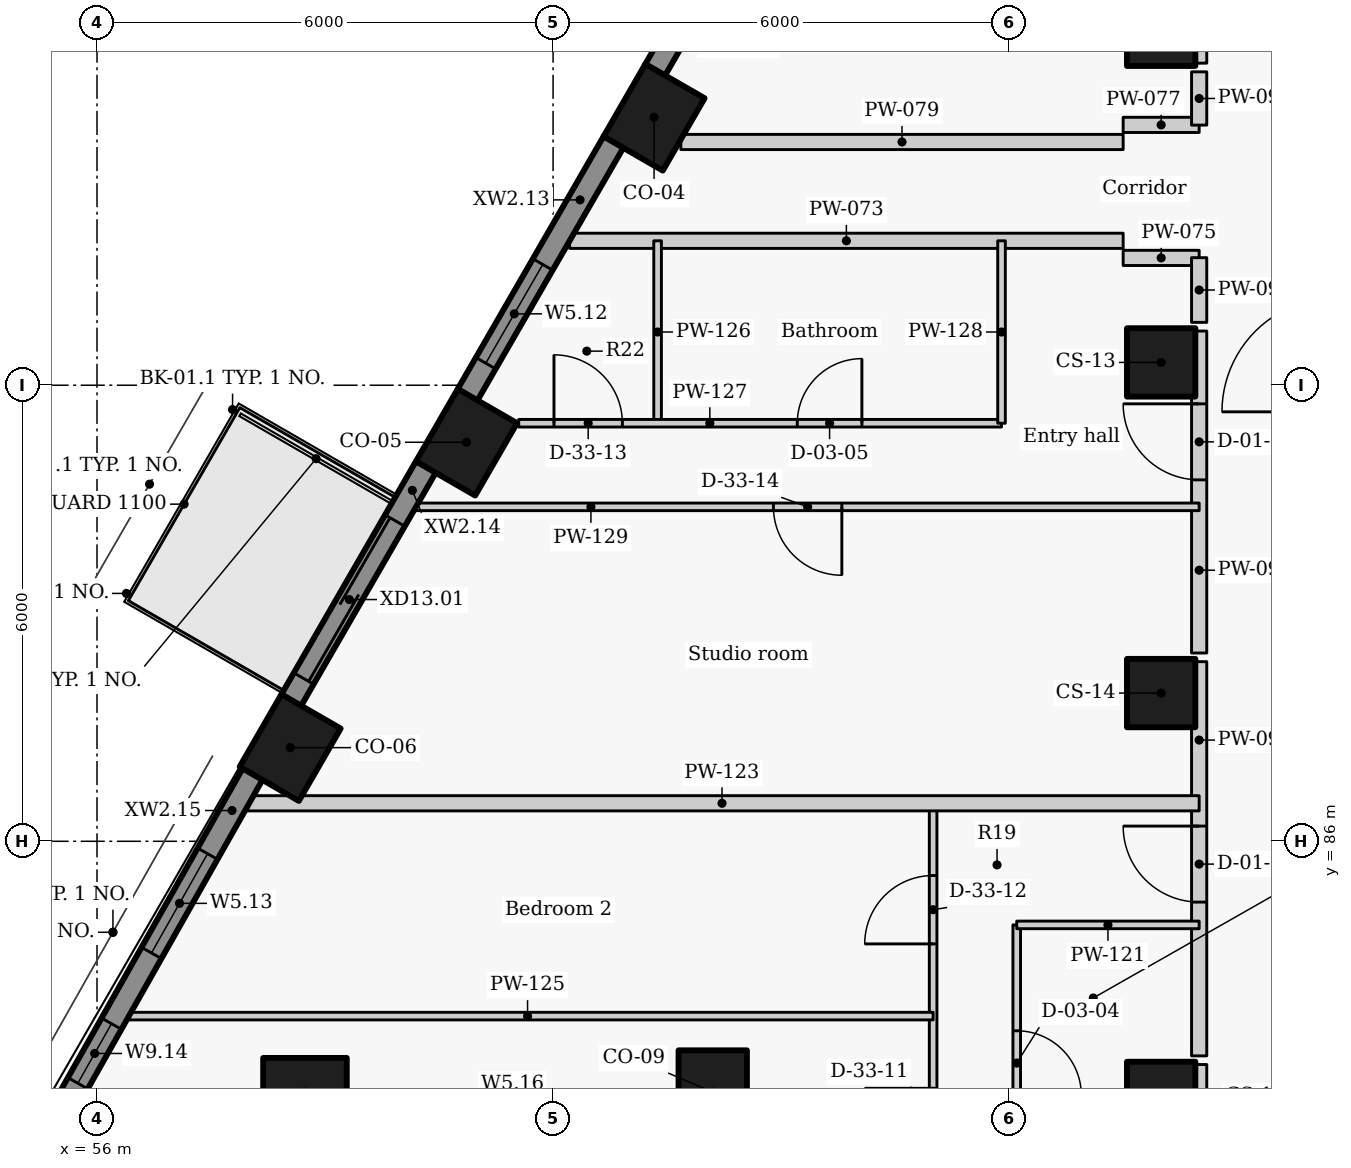
"""IFC4 building model, lengths in metres.
Left out: names, types, materials, properties, quantities, classifications, styles, units other than length and angle.
Written with IfcOpenShell. Run it as: python <this file> out.ifc"""

import sys

from ifc_helpers import new_model, si_unit, direction, frame, frame_2d, origin, origin_2d, place, context, subcontext, project, spatial, rectangle, extrude, element, fill, save


model = new_model("IFC4")
c1 = context("Model", 3, precision=1e-05, world=origin(), true_north=direction((0.0, 1.0)))
c2 = subcontext(c1, "Body", "Model", "MODEL_VIEW")
j1 = project(units=[si_unit("LENGTHUNIT", "METRE"), si_unit("PLANEANGLEUNIT", "RADIAN")], contexts=[c1])
p1 = place(None, origin())
s1 = spatial("IfcSite", under=j1, at=p1, CompositionType="ELEMENT")
p2 = place(p1, origin())
s2 = spatial("IfcBuilding", under=s1, at=p2, CompositionType="ELEMENT")
p3 = place(p2, frame((0.0, 0.0, 239.4)))
s3 = spatial("IfcBuildingStorey", under=s2, at=p3, CompositionType="ELEMENT", Elevation=239.4)
for number, where, z_axis, x_axis in (
    (1, (63.329, 95.525, 0.0), (0.0, 0.0, 1.0), (-0.5, -0.866, 0.0)),
    (2, (60.861, 91.25, 0.0), (0.0, 0.0, 1.0), (-0.5, -0.866, 0.0)),
    (3, (58.541, 87.232, 0.0), (0.0, 0.0, 1.0), (-0.5, -0.866, 0.0)),
    (4, (58.736, 82.7, 0.0), (0.0, 0.0, 1.0), (1.0, 0.0, 0.0)),
    (5, (64.101, 82.7, 0.0), (0.0, 0.0, 1.0), (0.0, -1.0, 0.0)),
):
    element("IfcColumn", number, at=place(p3, frame(where, z_axis=z_axis, x_axis=x_axis)), inside=s3, PredefinedType="COLUMN", context=c2, shape_type="SweptSolid", body=[
        extrude(rectangle(XDim=1.1, YDim=0.9, at=origin_2d()), origin(), (0.0, 0.0, 1.0), 3.3),
    ])
for number, where, z_axis, x_axis in (
    (6, (70.0, 96.65, 0.0), (0.0, 0.0, 1.0), (0.0, -1.0, 0.0)),
    (7, (70.0, 92.3, 0.0), (0.0, 0.0, 1.0), (0.0, -1.0, 0.0)),
    (8, (70.0, 87.95, 0.0), (0.0, 0.0, 1.0), (0.0, -1.0, 0.0)),
    (9, (70.0, 82.65, 0.0), (0.0, 0.0, 1.0), (0.0, -1.0, 0.0)),
):
    element("IfcColumn", number, at=place(p3, frame(where, z_axis=z_axis, x_axis=x_axis)), inside=s3, PredefinedType="COLUMN", context=c2, shape_type="SweptSolid", body=[
        extrude(rectangle(XDim=0.9, YDim=0.9, at=origin_2d()), origin(), (0.0, 0.0, 1.0), 3.3),
    ])
p4 = place(p3, frame((65.264, 99.477, 0.0), z_axis=(0.0, 0.0, 1.0), x_axis=(-0.499984490703, -0.866034357896, 0.0)))
e10 = element("IfcWall", 10, at=p4, inside=s3, PredefinedType="SOLIDWALL", context=c2, shape_type="SweptSolid", body=[
    extrude(rectangle(XDim=3.844, YDim=0.3, at=frame_2d((1.922, 0.0))), origin(), (0.0, 0.0, 1.0), 2.425),
])
p5 = place(p4, frame((0.872, 0.0, 0.9)))
e11 = element("IfcOpeningElement", 11, at=p5, cuts=e10, PredefinedType="OPENING", context=c2, shape_type="SweptSolid", body=[
    extrude(rectangle(XDim=2.1, YDim=1.1, at=frame_2d((1.05, 0.55))), frame((0.0, 0.16, 0.0), z_axis=(0.0, -1.0, 0.0), x_axis=(1.0, 0.0, 0.0)), (0.0, 0.0, 1.0), 0.32),
])
p6 = place(p3, frame((62.796, 95.202, 0.0), z_axis=(0.0, 0.0, 1.0), x_axis=(-0.499984490703, -0.866034357896, 0.0)))
e12 = element("IfcWall", 12, at=p6, inside=s3, PredefinedType="SOLIDWALL", context=c2, shape_type="SweptSolid", body=[
    extrude(rectangle(XDim=3.844, YDim=0.3, at=frame_2d((1.922, 0.0))), origin(), (0.0, 0.0, 1.0), 2.425),
])
p7 = place(p6, frame((1.863, 0.0, 0.9)))
e13 = element("IfcOpeningElement", 13, at=p7, cuts=e12, PredefinedType="OPENING", context=c2, shape_type="SweptSolid", body=[
    extrude(rectangle(XDim=1.5, YDim=1.1, at=frame_2d((0.75, 0.55))), frame((0.0, 0.16, 0.0), z_axis=(0.0, -1.0, 0.0), x_axis=(1.0, 0.0, 0.0)), (0.0, 0.0, 1.0), 0.32),
])
p8 = place(p3, frame((60.328, 90.927, 0.0), z_axis=(0.0, 0.0, 1.0), x_axis=(-0.500010404316, -0.866019396766, 0.0)))
e14 = element("IfcWall", 14, at=p8, inside=s3, PredefinedType="SOLIDWALL", context=c2, shape_type="SweptSolid", body=[
    extrude(rectangle(XDim=3.547, YDim=0.3, at=frame_2d((1.774, 0.0))), origin(), (0.0, 0.0, 1.0), 2.425),
])
p9 = place(p8, frame((0.817, 0.0, 0.0)))
e15 = element("IfcOpeningElement", 15, at=p9, cuts=e14, PredefinedType="OPENING", context=c2, shape_type="SweptSolid", body=[
    extrude(rectangle(XDim=2.4, YDim=2.0, at=frame_2d((1.2, 1.0))), frame((0.0, 0.16, 0.0), z_axis=(0.0, -1.0, 0.0), x_axis=(1.0, 0.0, 0.0)), (0.0, 0.0, 1.0), 0.32),
])
p10 = place(p3, frame((58.048, 86.886, 0.0), z_axis=(0.0, 0.0, 1.0), x_axis=(-0.492080931903, -0.870549456641, 0.0)))
e16 = element("IfcWall", 16, at=p10, inside=s3, PredefinedType="SOLIDWALL", context=c2, shape_type="SweptSolid", body=[
    extrude(rectangle(XDim=5.437, YDim=0.3, at=frame_2d((2.718, 0.0))), origin(), (0.0, 0.0, 1.0), 2.425),
])
p11 = place(p10, frame((1.206, 0.0, 0.9)))
e17 = element("IfcOpeningElement", 17, at=p11, cuts=e16, PredefinedType="OPENING", context=c2, shape_type="SweptSolid", body=[
    extrude(rectangle(XDim=1.5, YDim=1.1, at=frame_2d((0.75, 0.55))), frame((0.0, 0.16, 0.0), z_axis=(0.0, -1.0, 0.0), x_axis=(1.0, 0.0, 0.0)), (0.0, 0.0, 1.0), 0.32),
])
p12 = place(p10, frame((3.775, 0.0, 0.9)))
e18 = element("IfcOpeningElement", 18, at=p12, cuts=e16, PredefinedType="OPENING", context=c2, shape_type="SweptSolid", body=[
    extrude(rectangle(XDim=0.9, YDim=1.1, at=frame_2d((0.45, 0.55))), frame((0.0, 0.16, 0.0), z_axis=(0.0, -1.0, 0.0), x_axis=(1.0, 0.0, 0.0)), (0.0, 0.0, 1.0), 0.32),
])
p13 = place(p3, frame((62.218, 93.9, 0.0), z_axis=(0.0, 0.0, 1.0), x_axis=(1.0, 0.0, 0.0)))
e19 = element("IfcWall", 19, at=p13, inside=s3, PredefinedType="PARTITIONING", context=c2, shape_type="SweptSolid", body=[
    extrude(rectangle(XDim=7.282, YDim=0.2, at=frame_2d((3.641, 0.0))), origin(), (0.0, 0.0, 1.0), 2.405),
])
for number, where, z_axis, x_axis in (
    (20, (69.5, 93.675, 0.0), (0.0, 0.0, 1.0), (1.0, 0.0, 0.0)),
    (21, (69.5, 95.425, 0.0), (0.0, 0.0, 1.0), (1.0, 0.0, 0.0)),
):
    element("IfcWall", number, at=place(p3, frame(where, z_axis=z_axis, x_axis=x_axis)), inside=s3, PredefinedType="PARTITIONING", context=c2, shape_type="SweptSolid", body=[
        extrude(rectangle(XDim=1.0, YDim=0.2, at=frame_2d((0.5, 0.0))), origin(), (0.0, 0.0, 1.0), 2.505),
    ])
p14 = place(p3, frame((63.681, 95.2, 0.0), z_axis=(0.0, 0.0, 1.0), x_axis=(1.0, 0.0, 0.0)))
e22 = element("IfcWall", 22, at=p14, inside=s3, PredefinedType="PARTITIONING", context=c2, shape_type="SweptSolid", body=[
    extrude(rectangle(XDim=5.819, YDim=0.2, at=frame_2d((2.909, 0.0))), origin(), (0.0, 0.0, 1.0), 3.025),
])
p15 = place(p3, frame((70.5, 72.577, 0.0), z_axis=(0.0, 0.0, 1.0), x_axis=(0.0, 1.0, 0.0)))
e23 = element("IfcWall", 23, at=p15, inside=s3, PredefinedType="PARTITIONING", context=c2, shape_type="SweptSolid", body=[
    extrude(rectangle(XDim=10.486, YDim=0.2, at=frame_2d((5.243, 0.0))), origin(), (0.0, 0.0, 1.0), 3.025),
])
p16 = place(p15, frame((3.023, 0.0, 0.0)))
e24 = element("IfcOpeningElement", 24, at=p16, cuts=e23, PredefinedType="OPENING", context=c2, shape_type="SweptSolid", body=[
    extrude(rectangle(XDim=1.0, YDim=2.1, at=frame_2d((0.5, 1.05))), frame((0.0, 0.11, 0.0), z_axis=(0.0, -1.0, 0.0), x_axis=(1.0, 0.0, 0.0)), (0.0, 0.0, 1.0), 0.22),
])
p17 = place(p3, frame((70.5, 83.177, 0.0), z_axis=(0.0, 0.0, 1.0), x_axis=(0.0, 1.0, 0.0)))
e25 = element("IfcWall", 25, at=p17, inside=s3, PredefinedType="PARTITIONING", context=c2, shape_type="SweptSolid", body=[
    extrude(rectangle(XDim=5.186, YDim=0.2, at=frame_2d((2.593, 0.0))), origin(), (0.0, 0.0, 1.0), 3.025),
])
p18 = place(p17, frame((2.023, 0.0, 0.0)))
e26 = element("IfcOpeningElement", 26, at=p18, cuts=e25, PredefinedType="OPENING", context=c2, shape_type="SweptSolid", body=[
    extrude(rectangle(XDim=1.0, YDim=2.1, at=frame_2d((0.5, 1.05))), frame((0.0, 0.11, 0.0), z_axis=(0.0, -1.0, 0.0), x_axis=(1.0, 0.0, 0.0)), (0.0, 0.0, 1.0), 0.22),
])
p19 = place(p3, frame((70.5, 88.477, 0.0), z_axis=(0.0, 0.0, 1.0), x_axis=(0.0, 1.0, 0.0)))
e27 = element("IfcWall", 27, at=p19, inside=s3, PredefinedType="PARTITIONING", context=c2, shape_type="SweptSolid", body=[
    extrude(rectangle(XDim=4.236, YDim=0.2, at=frame_2d((2.118, 0.0))), origin(), (0.0, 0.0, 1.0), 3.025),
])
p20 = place(p19, frame((2.278, 0.0, 0.0)))
e28 = element("IfcOpeningElement", 28, at=p20, cuts=e27, PredefinedType="OPENING", context=c2, shape_type="SweptSolid", body=[
    extrude(rectangle(XDim=1.0, YDim=2.1, at=frame_2d((0.5, 1.05))), frame((0.0, 0.11, 0.0), z_axis=(0.0, -1.0, 0.0), x_axis=(1.0, 0.0, 0.0)), (0.0, 0.0, 1.0), 0.22),
])
p21 = place(p3, frame((70.5, 92.827, 0.0), z_axis=(0.0, 0.0, 1.0), x_axis=(0.0, 1.0, 0.0)))
e29 = element("IfcWall", 29, at=p21, inside=s3, PredefinedType="PARTITIONING", context=c2, shape_type="SweptSolid", body=[
    extrude(rectangle(XDim=0.851, YDim=0.2, at=frame_2d((0.426, 0.0))), origin(), (0.0, 0.0, 1.0), 3.025),
])
p22 = place(p3, frame((70.5, 95.422, 0.0), z_axis=(0.0, 0.0, 1.0), x_axis=(0.0, 1.0, 0.0)))
e30 = element("IfcWall", 30, at=p22, inside=s3, PredefinedType="PARTITIONING", context=c2, shape_type="SweptSolid", body=[
    extrude(rectangle(XDim=0.701, YDim=0.2, at=frame_2d((0.351, 0.0))), origin(), (0.0, 0.0, 1.0), 3.025),
])
p23 = place(p3, frame((70.5, 96.237, 0.0), z_axis=(0.0, 0.0, 1.0), x_axis=(0.0, 1.0, 0.0)))
e31 = element("IfcWall", 31, at=p23, inside=s3, PredefinedType="PARTITIONING", context=c2, shape_type="SweptSolid", body=[
    extrude(rectangle(XDim=5.176, YDim=0.2, at=frame_2d((2.588, 0.0))), origin(), (0.0, 0.0, 1.0), 3.025),
])
p24 = place(p23, frame((2.088, 0.0, 0.0)))
e32 = element("IfcOpeningElement", 32, at=p24, cuts=e31, PredefinedType="OPENING", context=c2, shape_type="SweptSolid", body=[
    extrude(rectangle(XDim=1.0, YDim=2.1, at=frame_2d((0.5, 1.05))), frame((0.0, 0.11, 0.0), z_axis=(0.0, -1.0, 0.0), x_axis=(1.0, 0.0, 0.0)), (0.0, 0.0, 1.0), 0.22),
])
p25 = place(p3, frame((68.1, 84.9, 0.0), z_axis=(0.0, 0.0, 1.0), x_axis=(0.0, -1.0, 0.0)))
e33 = element("IfcWall", 33, at=p25, inside=s3, PredefinedType="PARTITIONING", context=c2, shape_type="SweptSolid", body=[
    extrude(rectangle(XDim=8.0, YDim=0.1, at=frame_2d((4.0, 0.0))), origin(), (0.0, 0.0, 1.0), 3.025),
])
p26 = place(p25, frame((5.368, 0.0, 0.0)))
e34 = element("IfcOpeningElement", 34, at=p26, cuts=e33, PredefinedType="OPENING", context=c2, shape_type="SweptSolid", body=[
    extrude(rectangle(XDim=0.9, YDim=2.1, at=frame_2d((0.45, 1.05))), frame((0.0, 0.06, 0.0), z_axis=(0.0, -1.0, 0.0), x_axis=(1.0, 0.0, 0.0)), (0.0, 0.0, 1.0), 0.12),
])
p27 = place(p25, frame((1.393, 0.0, 0.0)))
e35 = element("IfcOpeningElement", 35, at=p27, cuts=e33, PredefinedType="OPENING", context=c2, shape_type="SweptSolid", body=[
    extrude(rectangle(XDim=0.85, YDim=2.1, at=frame_2d((0.425, 1.05))), frame((0.0, 0.06, 0.0), z_axis=(0.0, -1.0, 0.0), x_axis=(1.0, 0.0, 0.0)), (0.0, 0.0, 1.0), 0.12),
])
p28 = place(p3, frame((68.1, 84.9, 0.0), z_axis=(0.0, 0.0, 1.0), x_axis=(1.0, 0.0, 0.0)))
e36 = element("IfcWall", 36, at=p28, inside=s3, PredefinedType="PARTITIONING", context=c2, shape_type="SweptSolid", body=[
    extrude(rectangle(XDim=2.4, YDim=0.1, at=frame_2d((1.2, 0.0))), origin(), (0.0, 0.0, 1.0), 2.505),
])
p29 = place(p3, frame((67.0, 76.9, 0.0), z_axis=(0.0, 0.0, 1.0), x_axis=(0.0, 1.0, 0.0)))
e37 = element("IfcWall", 37, at=p29, inside=s3, PredefinedType="PARTITIONING", context=c2, shape_type="SweptSolid", body=[
    extrude(rectangle(XDim=9.6, YDim=0.1, at=frame_2d((4.8, 0.0))), origin(), (0.0, 0.0, 1.0), 3.025),
])
p30 = place(p29, frame((1.55, 0.0, 0.0)))
e38 = element("IfcOpeningElement", 38, at=p30, cuts=e37, PredefinedType="OPENING", context=c2, shape_type="SweptSolid", body=[
    extrude(rectangle(XDim=0.9, YDim=2.1, at=frame_2d((0.45, 1.05))), frame((0.0, 0.06, 0.0), z_axis=(0.0, -1.0, 0.0), x_axis=(1.0, 0.0, 0.0)), (0.0, 0.0, 1.0), 0.12),
])
p31 = place(p29, frame((4.95, 0.0, 0.0)))
e39 = element("IfcOpeningElement", 39, at=p31, cuts=e37, PredefinedType="OPENING", context=c2, shape_type="SweptSolid", body=[
    extrude(rectangle(XDim=0.9, YDim=2.1, at=frame_2d((0.45, 1.05))), frame((0.0, 0.06, 0.0), z_axis=(0.0, -1.0, 0.0), x_axis=(1.0, 0.0, 0.0)), (0.0, 0.0, 1.0), 0.12),
])
p32 = place(p29, frame((7.75, 0.0, 0.0)))
e40 = element("IfcOpeningElement", 40, at=p32, cuts=e37, PredefinedType="OPENING", context=c2, shape_type="SweptSolid", body=[
    extrude(rectangle(XDim=0.9, YDim=2.1, at=frame_2d((0.45, 1.05))), frame((0.0, 0.06, 0.0), z_axis=(0.0, -1.0, 0.0), x_axis=(1.0, 0.0, 0.0)), (0.0, 0.0, 1.0), 0.12),
])
p33 = place(p3, frame((57.945, 86.5, 0.0), z_axis=(0.0, 0.0, 1.0), x_axis=(1.0, 0.0, 0.0)))
e41 = element("IfcWall", 41, at=p33, inside=s3, PredefinedType="PARTITIONING", context=c2, shape_type="SweptSolid", body=[
    extrude(rectangle(XDim=12.555, YDim=0.2, at=frame_2d((6.277, 0.0))), origin(), (0.0, 0.0, 1.0), 2.405),
])
p34 = place(p3, frame((56.329, 83.7, 0.0), z_axis=(0.0, 0.0, 1.0), x_axis=(1.0, 0.0, 0.0)))
e42 = element("IfcWall", 42, at=p34, inside=s3, PredefinedType="PARTITIONING", context=c2, shape_type="SweptSolid", body=[
    extrude(rectangle(XDim=10.671, YDim=0.1, at=frame_2d((5.336, 0.0))), origin(), (0.0, 0.0, 1.0), 2.405),
])
p35 = place(p3, frame((63.375, 91.5, 0.0), z_axis=(0.0, 0.0, 1.0), x_axis=(0.0, 1.0, 0.0)))
e43 = element("IfcWall", 43, at=p35, inside=s3, PredefinedType="PARTITIONING", context=c2, shape_type="SweptSolid", body=[
    extrude(rectangle(XDim=2.4, YDim=0.1, at=frame_2d((1.2, 0.0))), origin(), (0.0, 0.0, 1.0), 3.025),
])
p36 = place(p3, frame((61.548, 91.5, 0.0), z_axis=(0.0, 0.0, 1.0), x_axis=(1.0, 0.0, 0.0)))
e44 = element("IfcWall", 44, at=p36, inside=s3, PredefinedType="PARTITIONING", context=c2, shape_type="SweptSolid", body=[
    extrude(rectangle(XDim=6.352, YDim=0.1, at=frame_2d((3.176, 0.0))), origin(), (0.0, 0.0, 1.0), 3.025),
])
p37 = place(p36, frame((0.464, 0.0, 0.0)))
e45 = element("IfcOpeningElement", 45, at=p37, cuts=e44, PredefinedType="OPENING", context=c2, shape_type="SweptSolid", body=[
    extrude(rectangle(XDim=0.9, YDim=2.1, at=frame_2d((0.45, 1.05))), frame((0.0, 0.06, 0.0), z_axis=(0.0, -1.0, 0.0), x_axis=(1.0, 0.0, 0.0)), (0.0, 0.0, 1.0), 0.12),
])
p38 = place(p36, frame((3.665, 0.0, 0.0)))
e46 = element("IfcOpeningElement", 46, at=p38, cuts=e44, PredefinedType="OPENING", context=c2, shape_type="SweptSolid", body=[
    extrude(rectangle(XDim=0.85, YDim=2.1, at=frame_2d((0.425, 1.05))), frame((0.0, 0.06, 0.0), z_axis=(0.0, -1.0, 0.0), x_axis=(1.0, 0.0, 0.0)), (0.0, 0.0, 1.0), 0.12),
])
p39 = place(p3, frame((67.9, 91.5, 0.0), z_axis=(0.0, 0.0, 1.0), x_axis=(0.0, 1.0, 0.0)))
e47 = element("IfcWall", 47, at=p39, inside=s3, PredefinedType="PARTITIONING", context=c2, shape_type="SweptSolid", body=[
    extrude(rectangle(XDim=2.4, YDim=0.1, at=frame_2d((1.2, 0.0))), origin(), (0.0, 0.0, 1.0), 3.025),
])
p40 = place(p3, frame((70.5, 90.4, 0.0), z_axis=(0.0, 0.0, 1.0), x_axis=(-1.0, 0.0, 0.0)))
e48 = element("IfcWall", 48, at=p40, inside=s3, PredefinedType="PARTITIONING", context=c2, shape_type="SweptSolid", body=[
    extrude(rectangle(XDim=10.303, YDim=0.1, at=frame_2d((5.151, 0.0))), origin(), (0.0, 0.0, 1.0), 2.405),
])
p41 = place(p40, frame((4.701, 0.0, 0.0)))
e49 = element("IfcOpeningElement", 49, at=p41, cuts=e48, PredefinedType="OPENING", context=c2, shape_type="SweptSolid", body=[
    extrude(rectangle(XDim=0.9, YDim=2.1, at=frame_2d((0.45, 1.05))), frame((0.0, 0.06, 0.0), z_axis=(0.0, -1.0, 0.0), x_axis=(1.0, 0.0, 0.0)), (0.0, 0.0, 1.0), 0.12),
])
p42 = place(p7, origin())
e50 = element("IfcWindow", 50, at=p42, inside=s3, PartitioningType="SINGLE_PANEL", PredefinedType="WINDOW", context=c2, shape_type="SweptSolid", body=[
    extrude(rectangle(XDim=1.5, YDim=1.1, at=frame_2d((0.75, 0.55))), frame((0.0, 0.03, 0.0), z_axis=(0.0, -1.0, 0.0), x_axis=(1.0, 0.0, 0.0)), (0.0, 0.0, 1.0), 0.06),
])
fill(e13, e50)
p43 = place(p9, origin())
e51 = element("IfcDoor", 51, at=p43, inside=s3, OperationType="DOUBLE_DOOR_SLIDING", PredefinedType="DOOR", context=c2, shape_type="SweptSolid", body=[
    extrude(rectangle(XDim=2.4, YDim=2.0, at=frame_2d((1.2, 1.0))), frame((0.0, 0.025, 0.0), z_axis=(0.0, -1.0, 0.0), x_axis=(1.0, 0.0, 0.0)), (0.0, 0.0, 1.0), 0.05),
])
fill(e15, e51)
p44 = place(p11, origin())
e52 = element("IfcWindow", 52, at=p44, inside=s3, PartitioningType="SINGLE_PANEL", PredefinedType="WINDOW", context=c2, shape_type="SweptSolid", body=[
    extrude(rectangle(XDim=1.5, YDim=1.1, at=frame_2d((0.75, 0.55))), frame((0.0, 0.03, 0.0), z_axis=(0.0, -1.0, 0.0), x_axis=(1.0, 0.0, 0.0)), (0.0, 0.0, 1.0), 0.06),
])
fill(e17, e52)
p45 = place(p12, origin())
e53 = element("IfcWindow", 53, at=p45, inside=s3, PartitioningType="SINGLE_PANEL", PredefinedType="WINDOW", context=c2, shape_type="SweptSolid", body=[
    extrude(rectangle(XDim=0.9, YDim=1.1, at=frame_2d((0.45, 0.55))), frame((0.0, 0.03, 0.0), z_axis=(0.0, -1.0, 0.0), x_axis=(1.0, 0.0, 0.0)), (0.0, 0.0, 1.0), 0.06),
])
fill(e18, e53)
p46 = place(p18, origin())
e54 = element("IfcDoor", 54, at=p46, inside=s3, OperationType="SINGLE_SWING_RIGHT", PredefinedType="DOOR", context=c2, shape_type="SweptSolid", body=[
    extrude(rectangle(XDim=1.0, YDim=2.1, at=frame_2d((0.5, 1.05))), frame((0.0, 0.025, 0.0), z_axis=(0.0, -1.0, 0.0), x_axis=(1.0, 0.0, 0.0)), (0.0, 0.0, 1.0), 0.05),
])
fill(e26, e54)
p47 = place(p27, origin())
e55 = element("IfcDoor", 55, at=p47, inside=s3, OperationType="SINGLE_SWING_RIGHT", PredefinedType="DOOR", context=c2, shape_type="SweptSolid", body=[
    extrude(rectangle(XDim=0.85, YDim=2.1, at=frame_2d((0.425, 1.05))), frame((0.0, 0.025, 0.0), z_axis=(0.0, -1.0, 0.0), x_axis=(1.0, 0.0, 0.0)), (0.0, 0.0, 1.0), 0.05),
])
fill(e35, e55)
p48 = place(p32, origin())
e56 = element("IfcDoor", 56, at=p48, inside=s3, OperationType="SINGLE_SWING_LEFT", PredefinedType="DOOR", context=c2, shape_type="SweptSolid", body=[
    extrude(rectangle(XDim=0.9, YDim=2.1, at=frame_2d((0.45, 1.05))), frame((0.0, 0.025, 0.0), z_axis=(0.0, -1.0, 0.0), x_axis=(1.0, 0.0, 0.0)), (0.0, 0.0, 1.0), 0.05),
])
fill(e40, e56)
p49 = place(p20, origin())
e57 = element("IfcDoor", 57, at=p49, inside=s3, OperationType="SINGLE_SWING_RIGHT", PredefinedType="DOOR", context=c2, shape_type="SweptSolid", body=[
    extrude(rectangle(XDim=1.0, YDim=2.1, at=frame_2d((0.5, 1.05))), frame((0.0, 0.025, 0.0), z_axis=(0.0, -1.0, 0.0), x_axis=(1.0, 0.0, 0.0)), (0.0, 0.0, 1.0), 0.05),
])
fill(e28, e57)
p50 = place(p37, origin())
e58 = element("IfcDoor", 58, at=p50, inside=s3, OperationType="SINGLE_SWING_LEFT", PredefinedType="DOOR", context=c2, shape_type="SweptSolid", body=[
    extrude(rectangle(XDim=0.9, YDim=2.1, at=frame_2d((0.45, 1.05))), frame((0.0, 0.025, 0.0), z_axis=(0.0, -1.0, 0.0), x_axis=(1.0, 0.0, 0.0)), (0.0, 0.0, 1.0), 0.05),
])
fill(e45, e58)
p51 = place(p38, origin())
e59 = element("IfcDoor", 59, at=p51, inside=s3, OperationType="SINGLE_SWING_RIGHT", PredefinedType="DOOR", context=c2, shape_type="SweptSolid", body=[
    extrude(rectangle(XDim=0.85, YDim=2.1, at=frame_2d((0.425, 1.05))), frame((0.0, 0.025, 0.0), z_axis=(0.0, -1.0, 0.0), x_axis=(1.0, 0.0, 0.0)), (0.0, 0.0, 1.0), 0.05),
])
fill(e46, e59)
p52 = place(p41, origin())
e60 = element("IfcDoor", 60, at=p52, inside=s3, OperationType="SINGLE_SWING_LEFT", PredefinedType="DOOR", context=c2, shape_type="SweptSolid", body=[
    extrude(rectangle(XDim=0.9, YDim=2.1, at=frame_2d((0.45, 1.05))), frame((0.0, 0.025, 0.0), z_axis=(0.0, -1.0, 0.0), x_axis=(1.0, 0.0, 0.0)), (0.0, 0.0, 1.0), 0.05),
])
fill(e49, e60)
save(model, sys.argv[1])
